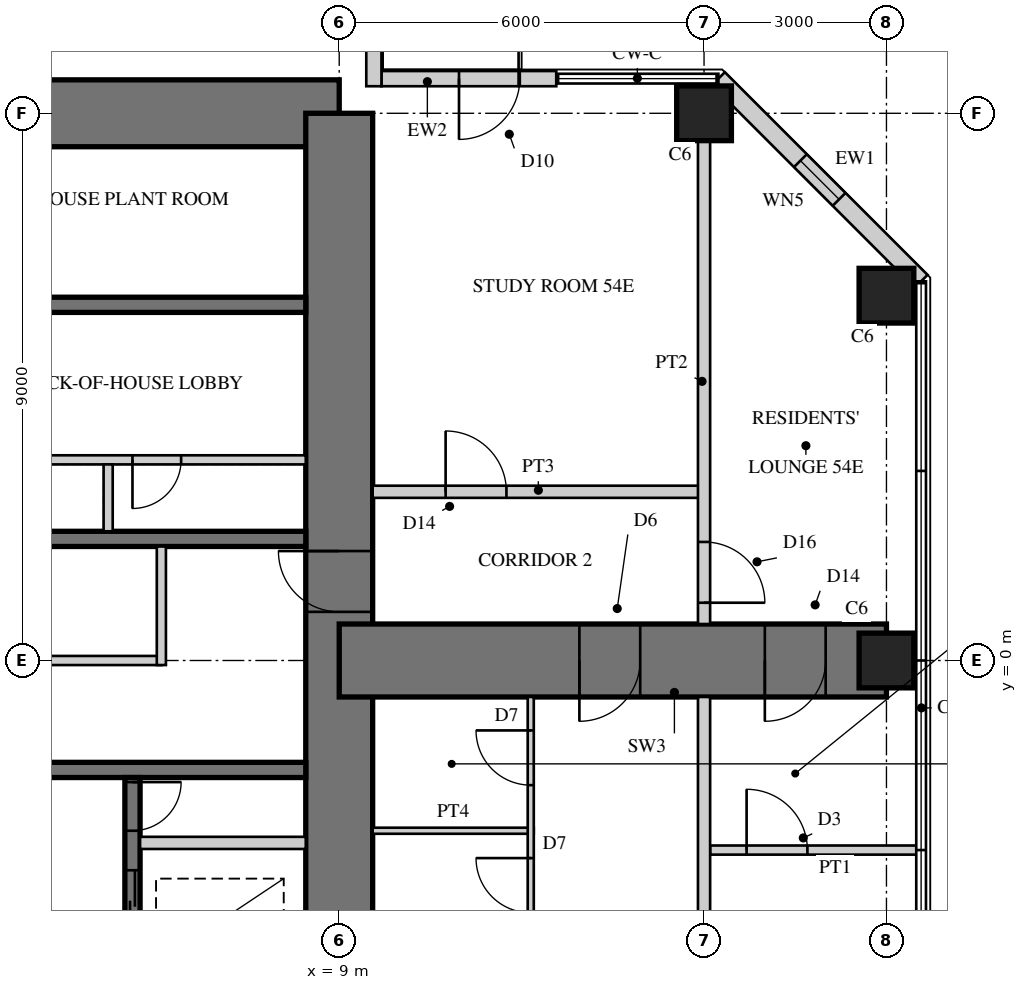
"""IFC4 building model, lengths in metres.
Left out: names, types, materials, properties, quantities, classifications, styles, units other than length and angle.
Written with IfcOpenShell. Run it as: python <this file> out.ifc"""

import sys

from ifc_helpers import new_model, si_unit, direction, frame, frame_2d, origin, origin_2d, place, context, subcontext, project, spatial, rectangle, hollow_rectangle, extrude, element, fill, save


model = new_model("IFC4")
c1 = context("Model", 3, precision=1e-05, world=origin(), true_north=direction((0.0, 1.0)))
c2 = subcontext(c1, "Body", "Model", "MODEL_VIEW")
j1 = project(units=[si_unit("LENGTHUNIT", "METRE"), si_unit("PLANEANGLEUNIT", "RADIAN")], contexts=[c1])
p1 = place(None, origin())
s1 = spatial("IfcSite", under=j1, at=p1, CompositionType="ELEMENT")
p2 = place(p1, origin())
s2 = spatial("IfcBuilding", under=s1, at=p2, CompositionType="ELEMENT")
p3 = place(p2, frame((0.0, 0.0, 213.7)))
s3 = spatial("IfcBuildingStorey", under=s2, at=p3, CompositionType="ELEMENT", Elevation=213.7)
p4 = place(p3, frame((9.0, 9.0, 0.0), z_axis=(0.0, 0.0, 1.0), x_axis=(-1.0, 0.0, 0.0)))
e1 = element("IfcWall", 1, at=p4, inside=s3, PredefinedType="SHEAR", context=c2, shape_type="SweptSolid", body=[
    extrude(rectangle(XDim=18.0, YDim=1.1, at=frame_2d((9.0, 0.0))), origin(), (0.0, 0.0, 1.0), 3.4),
])
p5 = place(p4, frame((9.8, 0.0, 0.0)))
e2 = element("IfcOpeningElement", 2, at=p5, cuts=e1, PredefinedType="OPENING", context=c2, shape_type="SweptSolid", body=[
    extrude(rectangle(XDim=1.0, YDim=2.4, at=frame_2d((0.5, 1.2))), frame((0.0, 0.56, 0.0), z_axis=(0.0, -1.0, 0.0), x_axis=(1.0, 0.0, 0.0)), (0.0, 0.0, 1.0), 1.12),
])
p6 = place(p3, frame((9.0, -9.0, 0.0), z_axis=(0.0, 0.0, 1.0), x_axis=(0.0, 1.0, 0.0)))
e3 = element("IfcWall", 3, at=p6, inside=s3, PredefinedType="SHEAR", context=c2, shape_type="SweptSolid", body=[
    extrude(rectangle(XDim=18.0, YDim=1.1, at=frame_2d((9.0, 0.0))), origin(), (0.0, 0.0, 1.0), 3.4),
])
p7 = place(p6, frame((9.8, 0.0, 0.0)))
e4 = element("IfcOpeningElement", 4, at=p7, cuts=e3, PredefinedType="OPENING", context=c2, shape_type="SweptSolid", body=[
    extrude(rectangle(XDim=1.0, YDim=2.4, at=frame_2d((0.5, 1.2))), frame((0.0, 0.56, 0.0), z_axis=(0.0, -1.0, 0.0), x_axis=(1.0, 0.0, 0.0)), (0.0, 0.0, 1.0), 1.12),
])
p8 = place(p3, frame((1.925, 2.0, 0.0), z_axis=(0.0, 0.0, 1.0), x_axis=(1.0, 0.0, 0.0)))
e5 = element("IfcWall", 5, at=p8, inside=s3, PredefinedType="SHEAR", context=c2, shape_type="SweptSolid", body=[
    extrude(rectangle(XDim=6.525, YDim=0.25, at=frame_2d((3.262, 0.0))), origin(), (0.0, 0.0, 1.0), 3.4),
])
p9 = place(p3, frame((1.925, 5.85, 0.0), z_axis=(0.0, 0.0, 1.0), x_axis=(1.0, 0.0, 0.0)))
e6 = element("IfcWall", 6, at=p9, inside=s3, PredefinedType="SHEAR", context=c2, shape_type="SweptSolid", body=[
    extrude(rectangle(XDim=6.525, YDim=0.25, at=frame_2d((3.262, 0.0))), origin(), (0.0, 0.0, 1.0), 3.4),
])
p10 = place(p9, frame((0.521, 0.0, 0.0)))
e7 = element("IfcOpeningElement", 7, at=p10, cuts=e6, PredefinedType="OPENING", context=c2, shape_type="SweptSolid", body=[
    extrude(rectangle(XDim=1.0, YDim=2.1, at=frame_2d((0.5, 1.05))), frame((0.0, 0.135, 0.0), z_axis=(0.0, -1.0, 0.0), x_axis=(1.0, 0.0, 0.0)), (0.0, 0.0, 1.0), 0.27),
])
p11 = place(p3, frame((1.925, 3.3, 0.0), z_axis=(0.0, 0.0, 1.0), x_axis=(1.0, 0.0, 0.0)))
e8 = element("IfcWall", 8, at=p11, inside=s3, PredefinedType="PARTITIONING", context=c2, shape_type="SweptSolid", body=[
    extrude(rectangle(XDim=6.525, YDim=0.15, at=frame_2d((3.262, 0.0))), origin(), (0.0, 0.0, 1.0), 3.4),
])
p12 = place(p11, frame((0.075, 0.0, 0.0)))
e9 = element("IfcOpeningElement", 9, at=p12, cuts=e8, PredefinedType="OPENING", context=c2, shape_type="SweptSolid", body=[
    extrude(rectangle(XDim=0.8, YDim=2.1, at=frame_2d((0.4, 1.05))), frame((0.0, 0.085, 0.0), z_axis=(0.0, -1.0, 0.0), x_axis=(1.0, 0.0, 0.0)), (0.0, 0.0, 1.0), 0.17),
])
p13 = place(p11, frame((3.675, 0.0, 0.0)))
e10 = element("IfcOpeningElement", 10, at=p13, cuts=e8, PredefinedType="OPENING", context=c2, shape_type="SweptSolid", body=[
    extrude(rectangle(XDim=0.8, YDim=2.1, at=frame_2d((0.4, 1.05))), frame((0.0, 0.085, 0.0), z_axis=(0.0, -1.0, 0.0), x_axis=(1.0, 0.0, 0.0)), (0.0, 0.0, 1.0), 0.17),
])
p14 = place(p3, frame((5.2, 2.125, 0.0), z_axis=(0.0, 0.0, 1.0), x_axis=(0.0, 1.0, 0.0)))
e11 = element("IfcWall", 11, at=p14, inside=s3, PredefinedType="PARTITIONING", context=c2, shape_type="SweptSolid", body=[
    extrude(rectangle(XDim=1.1, YDim=0.15, at=frame_2d((0.55, 0.0))), origin(), (0.0, 0.0, 1.0), 3.4),
])
p15 = place(p3, frame((2.125, -1.8, 0.0), z_axis=(0.0, 0.0, 1.0), x_axis=(1.0, 0.0, 0.0)))
e12 = element("IfcWall", 12, at=p15, inside=s3, PredefinedType="SHEAR", context=c2, shape_type="SweptSolid", body=[
    extrude(rectangle(XDim=6.325, YDim=0.25, at=frame_2d((3.163, 0.0))), origin(), (0.0, 0.0, 1.0), 3.4),
])
p16 = place(p3, frame((5.6, -1.925, 0.0), z_axis=(0.0, 0.0, 1.0), x_axis=(0.0, -1.0, 0.0)))
e13 = element("IfcWall", 13, at=p16, inside=s3, PredefinedType="SHEAR", context=c2, shape_type="SweptSolid", body=[
    extrude(rectangle(XDim=3.55, YDim=0.25, at=frame_2d((1.775, 0.0))), origin(), (0.0, 0.0, 1.0), 3.4),
])
p17 = place(p16, frame((1.525, 0.0, 0.0)))
e14 = element("IfcOpeningElement", 14, at=p17, cuts=e13, PredefinedType="OPENING", context=c2, shape_type="SweptSolid", body=[
    extrude(rectangle(XDim=1.1, YDim=2.2, at=frame_2d((0.55, 1.1))), frame((0.0, 0.135, 0.0), z_axis=(0.0, -1.0, 0.0), x_axis=(1.0, 0.0, 0.0)), (0.0, 0.0, 1.0), 0.27),
])
p18 = place(p16, frame((0.075, 0.0, 0.0)))
e15 = element("IfcOpeningElement", 15, at=p18, cuts=e13, PredefinedType="OPENING", context=c2, shape_type="SweptSolid", body=[
    extrude(rectangle(XDim=0.8, YDim=2.1, at=frame_2d((0.4, 1.05))), frame((0.0, 0.135, 0.0), z_axis=(0.0, -1.0, 0.0), x_axis=(1.0, 0.0, 0.0)), (0.0, 0.0, 1.0), 0.27),
])
p19 = place(p3, frame((5.725, -3.0, 0.0), z_axis=(0.0, 0.0, 1.0), x_axis=(1.0, 0.0, 0.0)))
e16 = element("IfcWall", 16, at=p19, inside=s3, PredefinedType="PARTITIONING", context=c2, shape_type="SweptSolid", body=[
    extrude(rectangle(XDim=2.725, YDim=0.2, at=frame_2d((1.362, 0.0))), origin(), (0.0, 0.0, 1.0), 3.4),
])
p20 = place(p3, frame((9.0, 0.0, 0.0), z_axis=(0.0, 0.0, 1.0), x_axis=(1.0, 0.0, 0.0)))
e17 = element("IfcWall", 17, at=p20, inside=s3, PredefinedType="SHEAR", context=c2, shape_type="SweptSolid", body=[
    extrude(rectangle(XDim=9.0, YDim=1.2, at=frame_2d((4.5, 0.0))), origin(), (0.0, 0.0, 1.0), 3.4),
])
p21 = place(p20, frame((3.95, 0.0, 0.0)))
e18 = element("IfcOpeningElement", 18, at=p21, cuts=e17, PredefinedType="OPENING", context=c2, shape_type="SweptSolid", body=[
    extrude(rectangle(XDim=1.0, YDim=2.15, at=frame_2d((0.5, 1.075))), frame((0.0, 0.61, 0.0), z_axis=(0.0, -1.0, 0.0), x_axis=(1.0, 0.0, 0.0)), (0.0, 0.0, 1.0), 1.22),
])
p22 = place(p20, frame((7.0, 0.0, 0.0)))
e19 = element("IfcOpeningElement", 19, at=p22, cuts=e17, PredefinedType="OPENING", context=c2, shape_type="SweptSolid", body=[
    extrude(rectangle(XDim=1.0, YDim=2.2, at=frame_2d((0.5, 1.1))), frame((0.0, 0.61, 0.0), z_axis=(0.0, -1.0, 0.0), x_axis=(1.0, 0.0, 0.0)), (0.0, 0.0, 1.0), 1.22),
])
for number, where, z_axis, x_axis in (
    (20, (15.0, 9.0, 0.0), (0.0, 0.0, 1.0), (1.0, 0.0, 0.0)),
    (21, (18.0, 0.0, 0.0), (0.0, 0.0, 1.0), (1.0, 0.0, 0.0)),
    (22, (18.0, 6.0, 0.0), (0.0, 0.0, 1.0), (1.0, 0.0, 0.0)),
):
    element("IfcColumn", number, at=place(p3, frame(where, z_axis=z_axis, x_axis=x_axis)), inside=s3, PredefinedType="COLUMN", context=c2, shape_type="SweptSolid", body=[
        extrude(rectangle(XDim=0.9, YDim=0.9, at=origin_2d()), origin(), (0.0, 0.0, 1.0), 3.4),
    ])
p23 = place(p3, frame((18.57, 6.236, 0.0), z_axis=(0.0, 0.0, 1.0), x_axis=(-0.707106781187, 0.707106781187, 0.0)))
e23 = element("IfcWall", 23, at=p23, inside=s3, PredefinedType="SOLIDWALL", context=c2, shape_type="SweptSolid", body=[
    extrude(rectangle(XDim=4.715, YDim=0.3, at=frame_2d((2.357, 0.0))), origin(), (0.0, 0.0, 1.0), 3.15),
])
p24 = place(p23, frame((1.907, 0.0, 0.3)))
e24 = element("IfcOpeningElement", 24, at=p24, cuts=e23, PredefinedType="OPENING", context=c2, shape_type="SweptSolid", body=[
    extrude(rectangle(XDim=0.9, YDim=2.4, at=frame_2d((0.45, 1.2))), frame((0.0, 0.16, 0.0), z_axis=(0.0, -1.0, 0.0), x_axis=(1.0, 0.0, 0.0)), (0.0, 0.0, 1.0), 0.32),
])
p25 = place(p3, frame((12.57, 9.57, 0.0), z_axis=(0.0, 0.0, 1.0), x_axis=(-1.0, 0.0, 0.0)))
e25 = element("IfcWall", 25, at=p25, inside=s3, PredefinedType="SOLIDWALL", context=c2, shape_type="SweptSolid", body=[
    extrude(rectangle(XDim=2.875, YDim=0.25, at=frame_2d((1.438, 0.0))), origin(), (0.0, 0.0, 1.0), 3.15),
])
p26 = place(p25, frame((0.6, 0.0, 0.0)))
e26 = element("IfcOpeningElement", 26, at=p26, cuts=e25, PredefinedType="OPENING", context=c2, shape_type="SweptSolid", body=[
    extrude(rectangle(XDim=1.0, YDim=2.2, at=frame_2d((0.5, 1.1))), frame((0.0, 0.135, 0.0), z_axis=(0.0, -1.0, 0.0), x_axis=(1.0, 0.0, 0.0)), (0.0, 0.0, 1.0), 0.27),
])
p27 = place(p3, frame((9.57, 9.445, 0.0), z_axis=(0.0, 0.0, 1.0), x_axis=(0.0, 1.0, 0.0)))
e27 = element("IfcWall", 27, at=p27, inside=s3, PredefinedType="SOLIDWALL", context=c2, shape_type="SweptSolid", body=[
    extrude(rectangle(XDim=3.125, YDim=0.25, at=frame_2d((1.562, 0.0))), origin(), (0.0, 0.0, 1.0), 3.15),
])
p28 = place(p27, frame((0.6, 0.0, 0.0)))
e28 = element("IfcOpeningElement", 28, at=p28, cuts=e27, PredefinedType="OPENING", context=c2, shape_type="SweptSolid", body=[
    extrude(rectangle(XDim=1.0, YDim=2.2, at=frame_2d((0.5, 1.1))), frame((0.0, 0.135, 0.0), z_axis=(0.0, -1.0, 0.0), x_axis=(1.0, 0.0, 0.0)), (0.0, 0.0, 1.0), 0.27),
])
p29 = place(p3, frame((2.325, 0.0, 0.0), z_axis=(0.0, 0.0, 1.0), x_axis=(1.0, 0.0, 0.0)))
e29 = element("IfcWall", 29, at=p29, inside=s3, PredefinedType="PARTITIONING", context=c2, shape_type="SweptSolid", body=[
    extrude(rectangle(XDim=3.75, YDim=0.15, at=frame_2d((1.875, 0.0))), origin(), (0.0, 0.0, 1.0), 3.15),
])
p30 = place(p29, frame((0.4, 0.0, 0.0)))
e30 = element("IfcOpeningElement", 30, at=p30, cuts=e29, PredefinedType="OPENING", context=c2, shape_type="SweptSolid", body=[
    extrude(rectangle(XDim=1.0, YDim=2.1, at=frame_2d((0.5, 1.05))), frame((0.0, 0.085, 0.0), z_axis=(0.0, -1.0, 0.0), x_axis=(1.0, 0.0, 0.0)), (0.0, 0.0, 1.0), 0.17),
])
p31 = place(p3, frame((6.075, -0.075, 0.0), z_axis=(0.0, 0.0, 1.0), x_axis=(0.0, 1.0, 0.0)))
e31 = element("IfcWall", 31, at=p31, inside=s3, PredefinedType="PARTITIONING", context=c2, shape_type="SweptSolid", body=[
    extrude(rectangle(XDim=1.95, YDim=0.15, at=frame_2d((0.975, 0.0))), origin(), (0.0, 0.0, 1.0), 3.15),
])
p32 = place(p3, frame((9.55, -2.8, 0.0), z_axis=(0.0, 0.0, 1.0), x_axis=(1.0, 0.0, 0.0)))
e32 = element("IfcWall", 32, at=p32, inside=s3, PredefinedType="PARTITIONING", context=c2, shape_type="SweptSolid", body=[
    extrude(rectangle(XDim=2.65, YDim=0.1, at=frame_2d((1.325, 0.0))), origin(), (0.0, 0.0, 1.0), 3.15),
])
p33 = place(p3, frame((12.15, -9.445, 0.0), z_axis=(0.0, 0.0, 1.0), x_axis=(0.0, 1.0, 0.0)))
e33 = element("IfcWall", 33, at=p33, inside=s3, PredefinedType="PARTITIONING", context=c2, shape_type="SweptSolid", body=[
    extrude(rectangle(XDim=8.845, YDim=0.1, at=frame_2d((4.422, 0.0))), origin(), (0.0, 0.0, 1.0), 3.15),
])
p34 = place(p33, frame((5.295, 0.0, 0.0)))
e34 = element("IfcOpeningElement", 34, at=p34, cuts=e33, PredefinedType="OPENING", context=c2, shape_type="SweptSolid", body=[
    extrude(rectangle(XDim=0.9, YDim=2.1, at=frame_2d((0.45, 1.05))), frame((0.0, 0.06, 0.0), z_axis=(0.0, -1.0, 0.0), x_axis=(1.0, 0.0, 0.0)), (0.0, 0.0, 1.0), 0.12),
])
p35 = place(p33, frame((7.395, 0.0, 0.0)))
e35 = element("IfcOpeningElement", 35, at=p35, cuts=e33, PredefinedType="OPENING", context=c2, shape_type="SweptSolid", body=[
    extrude(rectangle(XDim=0.9, YDim=2.1, at=frame_2d((0.45, 1.05))), frame((0.0, 0.06, 0.0), z_axis=(0.0, -1.0, 0.0), x_axis=(1.0, 0.0, 0.0)), (0.0, 0.0, 1.0), 0.12),
])
p36 = place(p3, frame((9.55, 2.775, 0.0), z_axis=(0.0, 0.0, 1.0), x_axis=(1.0, 0.0, 0.0)))
e36 = element("IfcWall", 36, at=p36, inside=s3, PredefinedType="SOLIDWALL", context=c2, shape_type="SweptSolid", body=[
    extrude(rectangle(XDim=5.45, YDim=0.2, at=frame_2d((2.725, 0.0))), origin(), (0.0, 0.0, 1.0), 3.15),
])
p37 = place(p36, frame((1.2, 0.0, 0.0)))
e37 = element("IfcOpeningElement", 37, at=p37, cuts=e36, PredefinedType="OPENING", context=c2, shape_type="SweptSolid", body=[
    extrude(rectangle(XDim=1.0, YDim=2.2, at=frame_2d((0.5, 1.1))), frame((0.0, 0.11, 0.0), z_axis=(0.0, -1.0, 0.0), x_axis=(1.0, 0.0, 0.0)), (0.0, 0.0, 1.0), 0.22),
])
p38 = place(p3, frame((15.1, -3.118, 0.0), z_axis=(0.0, 0.0, 1.0), x_axis=(1.0, 0.0, 0.0)))
e38 = element("IfcWall", 38, at=p38, inside=s3, PredefinedType="PARTITIONING", context=c2, shape_type="SweptSolid", body=[
    extrude(rectangle(XDim=3.43, YDim=0.15, at=frame_2d((1.715, 0.0))), origin(), (0.0, 0.0, 1.0), 3.15),
])
p39 = place(p38, frame((0.6, 0.0, 0.0)))
e39 = element("IfcOpeningElement", 39, at=p39, cuts=e38, PredefinedType="OPENING", context=c2, shape_type="SweptSolid", body=[
    extrude(rectangle(XDim=1.0, YDim=2.1, at=frame_2d((0.5, 1.05))), frame((0.0, 0.085, 0.0), z_axis=(0.0, -1.0, 0.0), x_axis=(1.0, 0.0, 0.0)), (0.0, 0.0, 1.0), 0.17),
])
p40 = place(p3, frame((15.0, -8.55, 0.0), z_axis=(0.0, 0.0, 1.0), x_axis=(0.0, 1.0, 0.0)))
e40 = element("IfcWall", 40, at=p40, inside=s3, PredefinedType="SOLIDWALL", context=c2, shape_type="SweptSolid", body=[
    extrude(rectangle(XDim=7.95, YDim=0.2, at=frame_2d((3.975, 0.0))), origin(), (0.0, 0.0, 1.0), 2.1),
])
p41 = place(p3, frame((15.0, 0.6, 0.0), z_axis=(0.0, 0.0, 1.0), x_axis=(0.0, 1.0, 0.0)))
e41 = element("IfcWall", 41, at=p41, inside=s3, PredefinedType="SOLIDWALL", context=c2, shape_type="SweptSolid", body=[
    extrude(rectangle(XDim=7.95, YDim=0.2, at=frame_2d((3.975, 0.0))), origin(), (0.0, 0.0, 1.0), 2.1),
])
p42 = place(p41, frame((0.35, 0.0, 0.0)))
e42 = element("IfcOpeningElement", 42, at=p42, cuts=e41, PredefinedType="OPENING", context=c2, shape_type="SweptSolid", body=[
    extrude(rectangle(XDim=1.0, YDim=2.0, at=frame_2d((0.5, 1.0))), frame((0.0, 0.11, 0.0), z_axis=(0.0, -1.0, 0.0), x_axis=(1.0, 0.0, 0.0)), (0.0, 0.0, 1.0), 0.22),
])
p43 = place(p24, origin())
e43 = element("IfcWindow", 43, at=p43, inside=s3, PartitioningType="SINGLE_PANEL", PredefinedType="WINDOW", context=c2, shape_type="SweptSolid", body=[
    extrude(hollow_rectangle(XDim=0.9, YDim=2.4, WallThickness=0.06, at=frame_2d((0.45, 1.2))), frame((0.0, 0.03, 0.0), z_axis=(0.0, -1.0, 0.0), x_axis=(1.0, 0.0, 0.0)), (0.0, 0.0, 1.0), 0.06),
    extrude(rectangle(XDim=0.779, YDim=2.279, at=frame_2d((0.45, 1.2))), frame((0.0, 0.03, 0.0), z_axis=(0.0, -1.0, 0.0), x_axis=(1.0, 0.0, 0.0)), (0.0, 0.0, 1.0), 0.06),
])
fill(e24, e43)
p44 = place(p26, origin())
e44 = element("IfcDoor", 44, at=p44, inside=s3, OperationType="SINGLE_SWING_RIGHT", PredefinedType="DOOR", context=c2, shape_type="SweptSolid", body=[
    extrude(hollow_rectangle(XDim=1.0, YDim=2.2, WallThickness=0.06, at=frame_2d((0.5, 1.1))), frame((0.0, 0.025, 0.0), z_axis=(0.0, -1.0, 0.0), x_axis=(1.0, 0.0, 0.0)), (0.0, 0.0, 1.0), 0.05),
    extrude(rectangle(XDim=0.879, YDim=2.079, at=frame_2d((0.5, 1.1))), frame((0.0, 0.025, 0.0), z_axis=(0.0, -1.0, 0.0), x_axis=(1.0, 0.0, 0.0)), (0.0, 0.0, 1.0), 0.05),
])
fill(e26, e44)
p45 = place(p34, origin())
e45 = element("IfcDoor", 45, at=p45, inside=s3, OperationType="SINGLE_SWING_RIGHT", PredefinedType="DOOR", context=c2, shape_type="SweptSolid", body=[
    extrude(rectangle(XDim=0.9, YDim=2.1, at=frame_2d((0.45, 1.05))), frame((0.0, 0.025, 0.0), z_axis=(0.0, -1.0, 0.0), x_axis=(1.0, 0.0, 0.0)), (0.0, 0.0, 1.0), 0.05),
])
fill(e34, e45)
p46 = place(p35, origin())
e46 = element("IfcDoor", 46, at=p46, inside=s3, OperationType="SINGLE_SWING_RIGHT", PredefinedType="DOOR", context=c2, shape_type="SweptSolid", body=[
    extrude(rectangle(XDim=0.9, YDim=2.1, at=frame_2d((0.45, 1.05))), frame((0.0, 0.025, 0.0), z_axis=(0.0, -1.0, 0.0), x_axis=(1.0, 0.0, 0.0)), (0.0, 0.0, 1.0), 0.05),
])
fill(e35, e46)
p47 = place(p37, origin())
e47 = element("IfcDoor", 47, at=p47, inside=s3, OperationType="SINGLE_SWING_LEFT", PredefinedType="DOOR", context=c2, shape_type="SweptSolid", body=[
    extrude(rectangle(XDim=1.0, YDim=2.2, at=frame_2d((0.5, 1.1))), frame((0.0, 0.025, 0.0), z_axis=(0.0, -1.0, 0.0), x_axis=(1.0, 0.0, 0.0)), (0.0, 0.0, 1.0), 0.05),
])
fill(e37, e47)
p48 = place(p39, origin())
e48 = element("IfcDoor", 48, at=p48, inside=s3, OperationType="SINGLE_SWING_LEFT", PredefinedType="DOOR", context=c2, shape_type="SweptSolid", body=[
    extrude(rectangle(XDim=1.0, YDim=2.1, at=frame_2d((0.5, 1.05))), frame((0.0, 0.025, 0.0), z_axis=(0.0, -1.0, 0.0), x_axis=(1.0, 0.0, 0.0)), (0.0, 0.0, 1.0), 0.05),
])
fill(e39, e48)
p49 = place(p42, frame((1.0, 0.0, 0.0), z_axis=(0.0, 0.0, 1.0), x_axis=(-1.0, 0.0, 0.0)))
e49 = element("IfcDoor", 49, at=p49, inside=s3, OperationType="SINGLE_SWING_RIGHT", PredefinedType="DOOR", context=c2, shape_type="SweptSolid", body=[
    extrude(rectangle(XDim=1.0, YDim=2.0, at=frame_2d((0.5, 1.0))), frame((0.0, 0.025, 0.0), z_axis=(0.0, -1.0, 0.0), x_axis=(1.0, 0.0, 0.0)), (0.0, 0.0, 1.0), 0.05),
])
fill(e42, e49)
p50 = place(p21, frame((1.0, 0.0, 0.0), z_axis=(0.0, 0.0, 1.0), x_axis=(-1.0, 0.0, 0.0)))
e50 = element("IfcDoor", 50, at=p50, inside=s3, OperationType="SINGLE_SWING_RIGHT", PredefinedType="DOOR", context=c2, shape_type="SweptSolid", body=[
    extrude(rectangle(XDim=1.0, YDim=2.15, at=frame_2d((0.5, 1.075))), frame((0.0, 0.025, 0.0), z_axis=(0.0, -1.0, 0.0), x_axis=(1.0, 0.0, 0.0)), (0.0, 0.0, 1.0), 0.05),
])
fill(e18, e50)
p51 = place(p22, frame((1.0, 0.0, 0.0), z_axis=(0.0, 0.0, 1.0), x_axis=(-1.0, 0.0, 0.0)))
e51 = element("IfcDoor", 51, at=p51, inside=s3, OperationType="SINGLE_SWING_RIGHT", PredefinedType="DOOR", context=c2, shape_type="SweptSolid", body=[
    extrude(rectangle(XDim=1.0, YDim=2.2, at=frame_2d((0.5, 1.1))), frame((0.0, 0.025, 0.0), z_axis=(0.0, -1.0, 0.0), x_axis=(1.0, 0.0, 0.0)), (0.0, 0.0, 1.0), 0.05),
])
fill(e19, e51)
p52 = place(p7, origin())
e52 = element("IfcDoor", 52, at=p52, inside=s3, OperationType="SINGLE_SWING_RIGHT", PredefinedType="DOOR", context=c2, shape_type="SweptSolid", body=[
    extrude(rectangle(XDim=1.0, YDim=2.4, at=frame_2d((0.5, 1.2))), frame((0.0, 0.055, 0.0), z_axis=(0.0, -1.0, 0.0), x_axis=(1.0, 0.0, 0.0)), (0.0, 0.0, 1.0), 0.05),
])
fill(e4, e52)
p53 = place(p13, frame((0.8, 0.0, 0.0), z_axis=(0.0, 0.0, 1.0), x_axis=(-1.0, 0.0, 0.0)))
e53 = element("IfcDoor", 53, at=p53, inside=s3, OperationType="SINGLE_SWING_RIGHT", PredefinedType="DOOR", context=c2, shape_type="SweptSolid", body=[
    extrude(rectangle(XDim=0.8, YDim=2.1, at=frame_2d((0.4, 1.05))), frame((0.0, 0.025, 0.0), z_axis=(0.0, -1.0, 0.0), x_axis=(1.0, 0.0, 0.0)), (0.0, 0.0, 1.0), 0.05),
])
fill(e10, e53)
p54 = place(p17, origin())
e54 = element("IfcDoor", 54, at=p54, inside=s3, OperationType="DOUBLE_DOOR_SLIDING", PredefinedType="DOOR", context=c2, shape_type="SweptSolid", body=[
    extrude(rectangle(XDim=1.1, YDim=2.2, at=frame_2d((0.55, 1.1))), frame((0.0, 0.025, 0.0), z_axis=(0.0, -1.0, 0.0), x_axis=(1.0, 0.0, 0.0)), (0.0, 0.0, 1.0), 0.05),
])
fill(e14, e54)
p55 = place(p18, origin())
e55 = element("IfcDoor", 55, at=p55, inside=s3, OperationType="SINGLE_SWING_LEFT", PredefinedType="DOOR", context=c2, shape_type="SweptSolid", body=[
    extrude(rectangle(XDim=0.8, YDim=2.1, at=frame_2d((0.4, 1.05))), frame((0.0, 0.025, 0.0), z_axis=(0.0, -1.0, 0.0), x_axis=(1.0, 0.0, 0.0)), (0.0, 0.0, 1.0), 0.05),
])
fill(e15, e55)
save(model, sys.argv[1])
